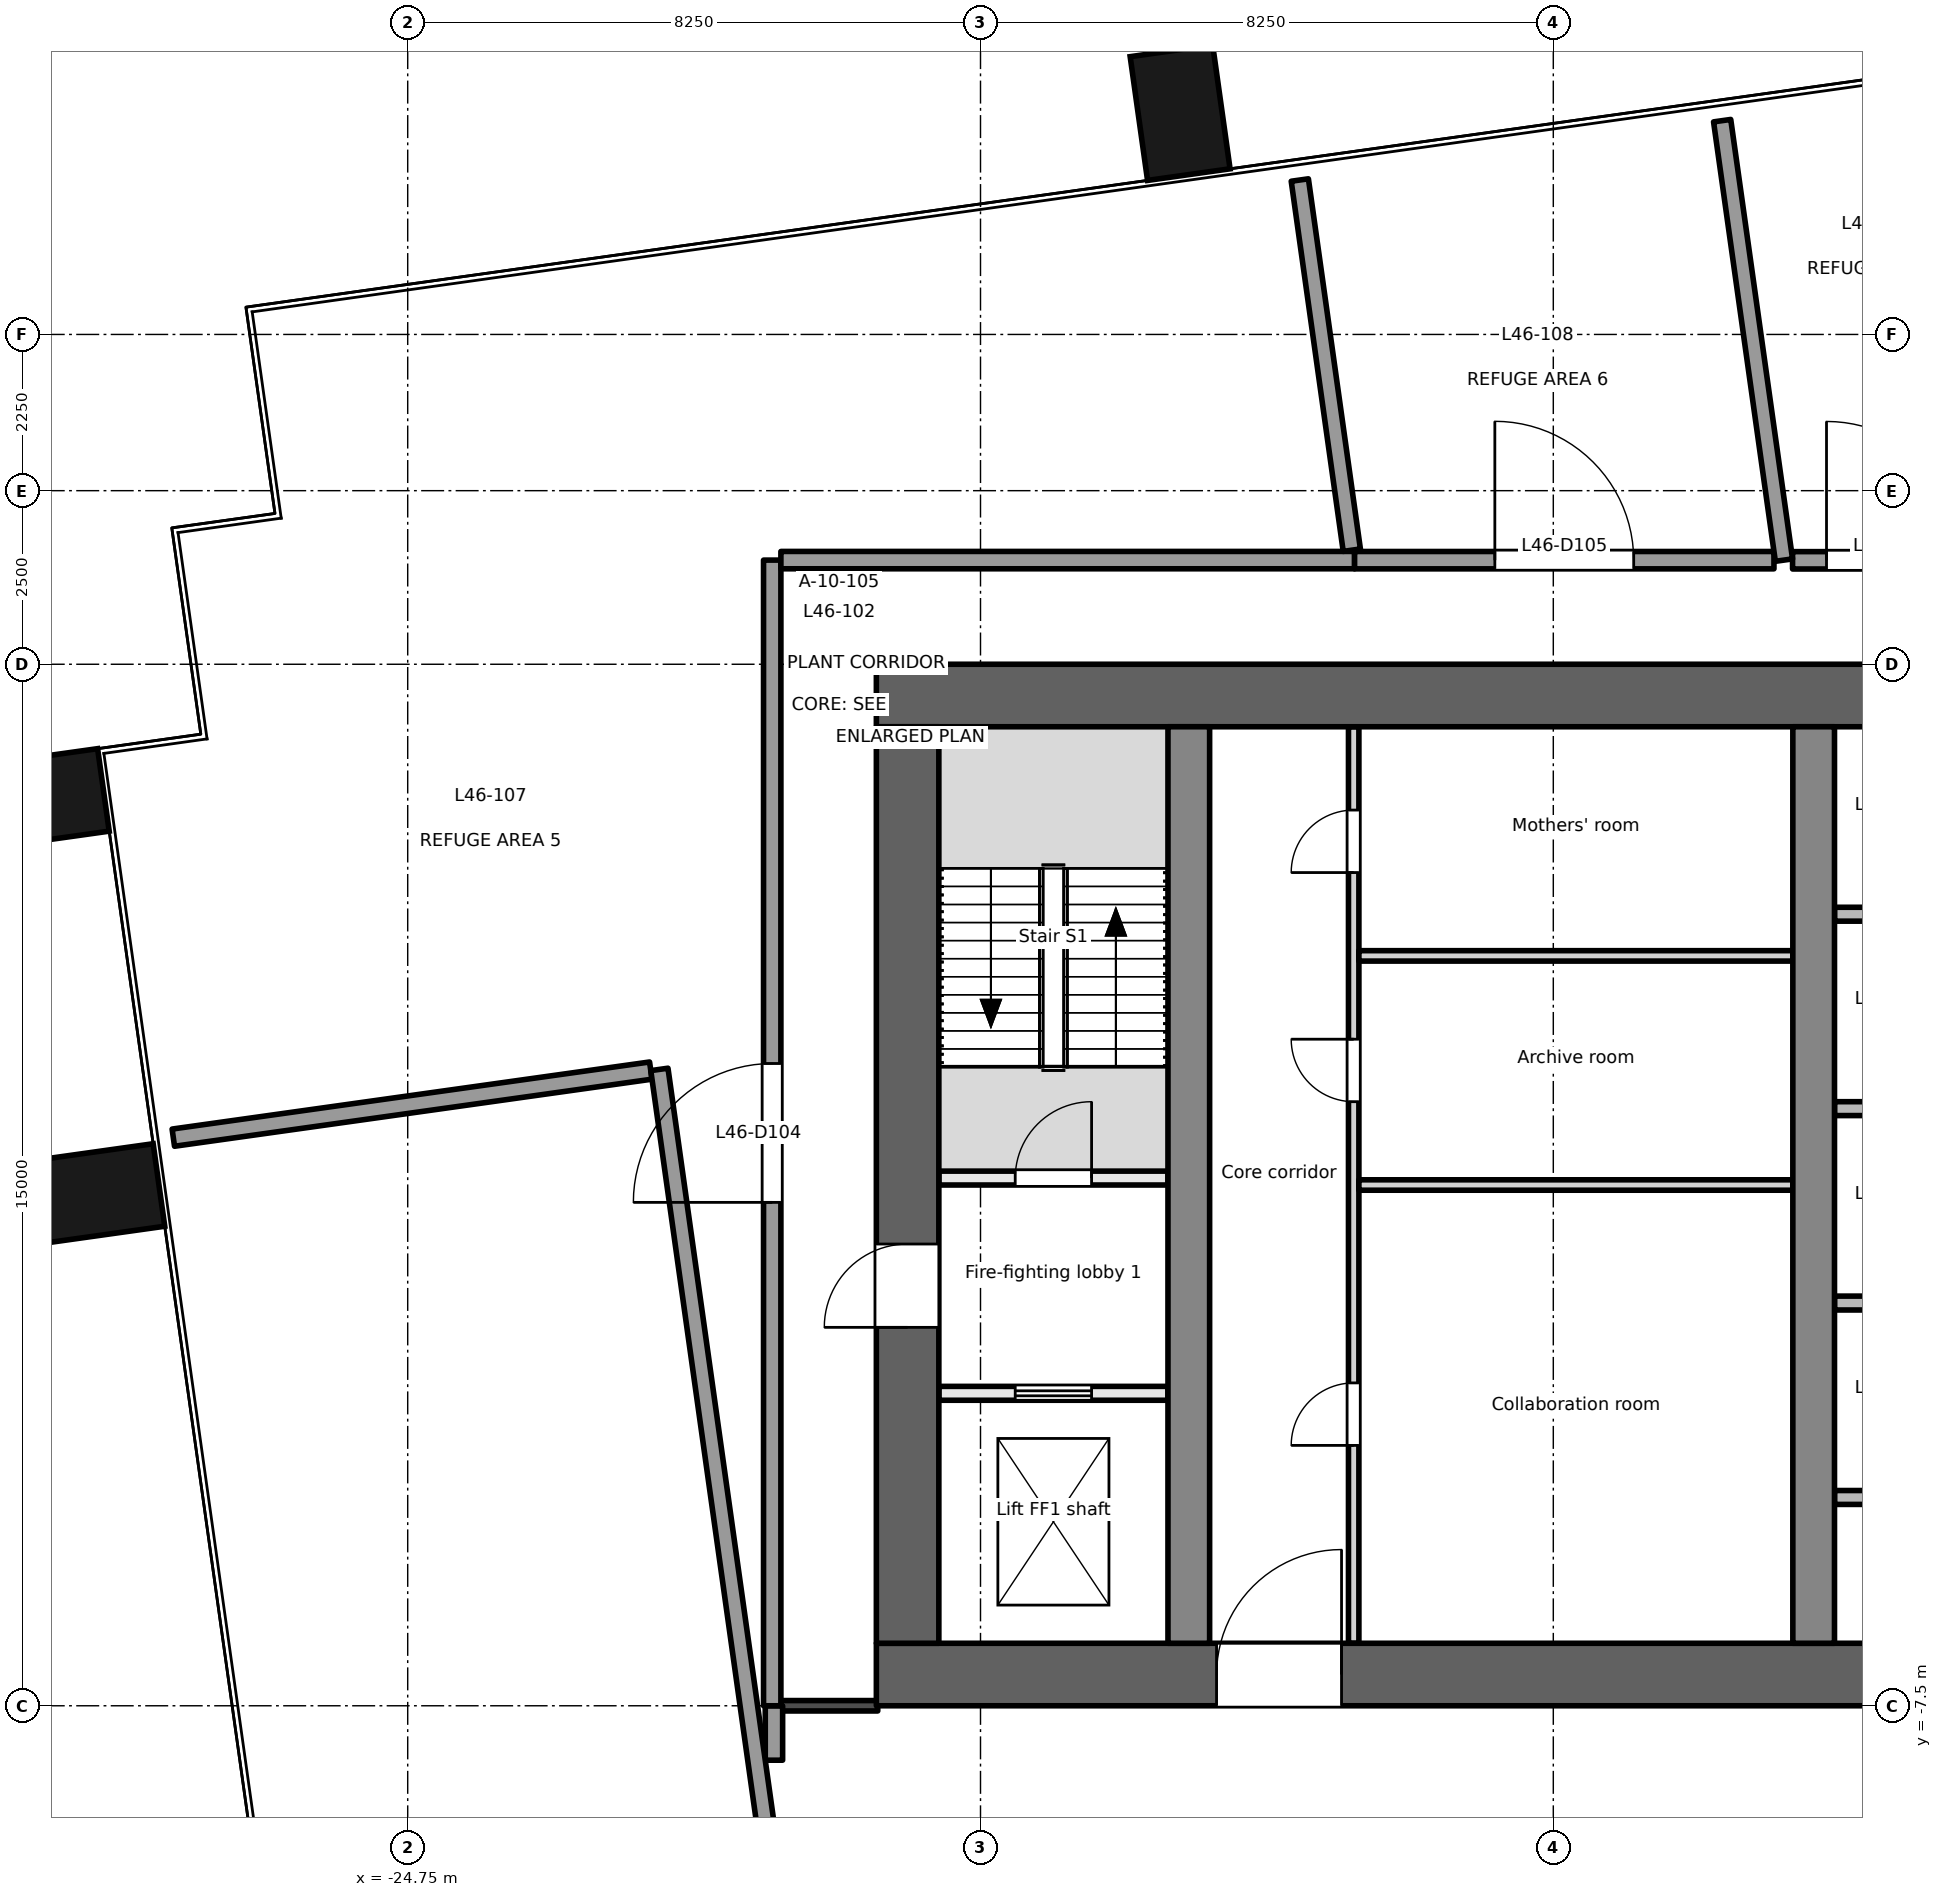
"""IFC4 building model, lengths in metres.
Left out: names, types, materials, properties, quantities, classifications, styles, units other than length and angle.
Written with IfcOpenShell. Run it as: python <this file> out.ifc"""

import sys

from ifc_helpers import new_model, si_unit, direction, frame, frame_2d, origin, origin_2d, place, context, subcontext, project, spatial, rectangle, extrude, element, fill, save


model = new_model("IFC4")
c1 = context("Model", 3, precision=1e-05, world=origin(), true_north=direction((0.0, 1.0)))
c2 = subcontext(c1, "Body", "Model", "MODEL_VIEW")
j1 = project(units=[si_unit("LENGTHUNIT", "METRE"), si_unit("PLANEANGLEUNIT", "RADIAN")], contexts=[c1])
p1 = place(None, origin())
s1 = spatial("IfcSite", under=j1, at=p1, CompositionType="ELEMENT")
p2 = place(p1, origin())
s2 = spatial("IfcBuilding", under=s1, at=p2, CompositionType="ELEMENT")
p3 = place(p2, frame((0.0, 0.0, 199.7)))
s3 = spatial("IfcBuildingStorey", under=s2, at=p3, CompositionType="ELEMENT", Elevation=199.7)
for number, where, z_axis, x_axis in (
    (1, (-29.224, -0.125, -0.2), (0.0, 0.0, 1.0), (-0.139, 0.99, 0.0)),
    (2, (-30.024, 5.565, -0.2), (0.0, 0.0, 1.0), (-0.139, 0.99, 0.0)),
    (3, (-13.625, 15.443, -0.2), (0.0, 0.0, 1.0), (0.99, 0.139, 0.0)),
):
    element("IfcColumn", number, at=place(p3, frame(where, z_axis=z_axis, x_axis=x_axis)), inside=s3, PredefinedType="COLUMN", context=c2, shape_type="SweptSolid", body=[
        extrude(rectangle(XDim=1.2, YDim=1.8, at=origin_2d()), origin(), (0.0, 0.0, 1.0), 8.4),
    ])
p4 = place(p3, frame((-18.0, -7.05, -0.2), z_axis=(0.0, 0.0, 1.0), x_axis=(1.0, 0.0, 0.0)))
e4 = element("IfcWall", 4, at=p4, inside=s3, PredefinedType="SHEAR", context=c2, shape_type="SweptSolid", body=[
    extrude(rectangle(XDim=36.0, YDim=0.9, at=frame_2d((18.0, 0.0))), origin(), (0.0, 0.0, 1.0), 8.4),
])
p5 = place(p4, frame((4.9, 0.0, 0.2)))
e5 = element("IfcOpeningElement", 5, at=p5, cuts=e4, PredefinedType="OPENING", context=c2, shape_type="SweptSolid", body=[
    extrude(rectangle(XDim=1.8, YDim=2.1, at=frame_2d((0.9, 1.05))), frame((0.0, 0.46, 0.0), z_axis=(0.0, -1.0, 0.0), x_axis=(1.0, 0.0, 0.0)), (0.0, 0.0, 1.0), 0.921),
])
p6 = place(p4, frame((17.4, 0.0, 0.2)))
e6 = element("IfcOpeningElement", 6, at=p6, cuts=e4, PredefinedType="OPENING", context=c2, shape_type="SweptSolid", body=[
    extrude(rectangle(XDim=1.2, YDim=2.1, at=frame_2d((0.6, 1.05))), frame((0.0, 0.46, 0.0), z_axis=(0.0, -1.0, 0.0), x_axis=(1.0, 0.0, 0.0)), (0.0, 0.0, 1.0), 0.921),
])
p7 = place(p4, frame((26.1, 0.0, 0.2)))
e7 = element("IfcOpeningElement", 7, at=p7, cuts=e4, PredefinedType="OPENING", context=c2, shape_type="SweptSolid", body=[
    extrude(rectangle(XDim=2.4, YDim=2.1, at=frame_2d((1.2, 1.05))), frame((0.0, 0.46, 0.0), z_axis=(0.0, -1.0, 0.0), x_axis=(1.0, 0.0, 0.0)), (0.0, 0.0, 1.0), 0.921),
])
p8 = place(p3, frame((-18.0, 7.05, -0.2), z_axis=(0.0, 0.0, 1.0), x_axis=(1.0, 0.0, 0.0)))
e8 = element("IfcWall", 8, at=p8, inside=s3, PredefinedType="SHEAR", context=c2, shape_type="SweptSolid", body=[
    extrude(rectangle(XDim=36.0, YDim=0.9, at=frame_2d((18.0, 0.0))), origin(), (0.0, 0.0, 1.0), 8.4),
])
p9 = place(p3, frame((-17.55, -6.6, -0.2), z_axis=(0.0, 0.0, 1.0), x_axis=(0.0, 1.0, 0.0)))
e9 = element("IfcWall", 9, at=p9, inside=s3, PredefinedType="SHEAR", context=c2, shape_type="SweptSolid", body=[
    extrude(rectangle(XDim=13.2, YDim=0.9, at=frame_2d((6.6, 0.0))), origin(), (0.0, 0.0, 1.0), 8.4),
])
p10 = place(p9, frame((4.55, 0.0, 0.2)))
e10 = element("IfcOpeningElement", 10, at=p10, cuts=e9, PredefinedType="OPENING", context=c2, shape_type="SweptSolid", body=[
    extrude(rectangle(XDim=1.2, YDim=2.1, at=frame_2d((0.6, 1.05))), frame((0.0, 0.46, 0.0), z_axis=(0.0, -1.0, 0.0), x_axis=(1.0, 0.0, 0.0)), (0.0, 0.0, 1.0), 0.921),
])
for number, where, z_axis, x_axis in (
    (11, (-13.5, -6.6, -0.2), (0.0, 0.0, 1.0), (0.0, 1.0, 0.0)),
    (12, (-4.5, -6.6, -0.2), (0.0, 0.0, 1.0), (0.0, 1.0, 0.0)),
):
    element("IfcWall", number, at=place(p3, frame(where, z_axis=z_axis, x_axis=x_axis)), inside=s3, PredefinedType="SHEAR", context=c2, shape_type="SweptSolid", body=[
        extrude(rectangle(XDim=13.2, YDim=0.6, at=frame_2d((6.6, 0.0))), origin(), (0.0, 0.0, 1.0), 8.4),
    ])
p11 = place(p3, frame((-17.1, -3.0, 0.0), z_axis=(0.0, 0.0, 1.0), x_axis=(1.0, 0.0, 0.0)))
e13 = element("IfcWall", 13, at=p11, inside=s3, PredefinedType="PARTITIONING", context=c2, shape_type="SweptSolid", body=[
    extrude(rectangle(XDim=3.3, YDim=0.2, at=frame_2d((1.65, 0.0))), origin(), (0.0, 0.0, 1.0), 8.2),
])
p12 = place(p11, frame((1.1, 0.0, 0.0)))
e14 = element("IfcOpeningElement", 14, at=p12, cuts=e13, PredefinedType="OPENING", context=c2, shape_type="SweptSolid", body=[
    extrude(rectangle(XDim=1.1, YDim=2.1, at=frame_2d((0.55, 1.05))), frame((0.0, 0.111, 0.0), z_axis=(0.0, -1.0, 0.0), x_axis=(1.0, 0.0, 0.0)), (0.0, 0.0, 1.0), 0.221),
])
p13 = place(p3, frame((-17.1, 0.1, 0.0), z_axis=(0.0, 0.0, 1.0), x_axis=(1.0, 0.0, 0.0)))
e15 = element("IfcWall", 15, at=p13, inside=s3, PredefinedType="PARTITIONING", context=c2, shape_type="SweptSolid", body=[
    extrude(rectangle(XDim=3.3, YDim=0.2, at=frame_2d((1.65, 0.0))), origin(), (0.0, 0.0, 1.0), 8.2),
])
p14 = place(p13, frame((1.1, 0.0, 0.0)))
e16 = element("IfcOpeningElement", 16, at=p14, cuts=e15, PredefinedType="OPENING", context=c2, shape_type="SweptSolid", body=[
    extrude(rectangle(XDim=1.1, YDim=2.1, at=frame_2d((0.55, 1.05))), frame((0.0, 0.111, 0.0), z_axis=(0.0, -1.0, 0.0), x_axis=(1.0, 0.0, 0.0)), (0.0, 0.0, 1.0), 0.221),
])
p15 = place(p3, frame((-11.125, -6.6, 0.0), z_axis=(0.0, 0.0, 1.0), x_axis=(0.0, 1.0, 0.0)))
e17 = element("IfcWall", 17, at=p15, inside=s3, PredefinedType="PARTITIONING", context=c2, shape_type="SweptSolid", body=[
    extrude(rectangle(XDim=13.2, YDim=0.15, at=frame_2d((6.6, 0.0))), origin(), (0.0, 0.0, 1.0), 8.2),
])
p16 = place(p15, frame((2.85, 0.0, 0.0)))
e18 = element("IfcOpeningElement", 18, at=p16, cuts=e17, PredefinedType="OPENING", context=c2, shape_type="SweptSolid", body=[
    extrude(rectangle(XDim=0.9, YDim=2.1, at=frame_2d((0.45, 1.05))), frame((0.0, 0.085, 0.0), z_axis=(0.0, -1.0, 0.0), x_axis=(1.0, 0.0, 0.0)), (0.0, 0.0, 1.0), 0.171),
])
p17 = place(p15, frame((7.8, 0.0, 0.0)))
e19 = element("IfcOpeningElement", 19, at=p17, cuts=e17, PredefinedType="OPENING", context=c2, shape_type="SweptSolid", body=[
    extrude(rectangle(XDim=0.9, YDim=2.1, at=frame_2d((0.45, 1.05))), frame((0.0, 0.085, 0.0), z_axis=(0.0, -1.0, 0.0), x_axis=(1.0, 0.0, 0.0)), (0.0, 0.0, 1.0), 0.171),
])
p18 = place(p15, frame((11.1, 0.0, 0.0)))
e20 = element("IfcOpeningElement", 20, at=p18, cuts=e17, PredefinedType="OPENING", context=c2, shape_type="SweptSolid", body=[
    extrude(rectangle(XDim=0.9, YDim=2.1, at=frame_2d((0.45, 1.05))), frame((0.0, 0.085, 0.0), z_axis=(0.0, -1.0, 0.0), x_axis=(1.0, 0.0, 0.0)), (0.0, 0.0, 1.0), 0.171),
])
for number, where, z_axis, x_axis in (
    (21, (-11.05, 0.0, 0.0), (0.0, 0.0, 1.0), (1.0, 0.0, 0.0)),
    (22, (-11.05, 3.3, 0.0), (0.0, 0.0, 1.0), (1.0, 0.0, 0.0)),
):
    element("IfcWall", number, at=place(p3, frame(where, z_axis=z_axis, x_axis=x_axis)), inside=s3, PredefinedType="PARTITIONING", context=c2, shape_type="SweptSolid", body=[
        extrude(rectangle(XDim=6.25, YDim=0.15, at=frame_2d((3.125, 0.0))), origin(), (0.0, 0.0, 1.0), 8.2),
    ])
for number, where, z_axis, x_axis in (
    (23, (-4.2, -1.7, 0.0), (0.0, 0.0, 1.0), (1.0, 0.0, 0.0)),
    (24, (-4.2, 1.1, 0.0), (0.0, 0.0, 1.0), (1.0, 0.0, 0.0)),
    (25, (-4.2, 3.9, 0.0), (0.0, 0.0, 1.0), (1.0, 0.0, 0.0)),
    (26, (-4.2, -4.5, 0.0), (0.0, 0.0, 1.0), (1.0, 0.0, 0.0)),
):
    element("IfcWall", number, at=place(p3, frame(where, z_axis=z_axis, x_axis=x_axis)), inside=s3, PredefinedType="PARTITIONING", context=c2, shape_type="SweptSolid", body=[
        extrude(rectangle(XDim=2.3, YDim=0.2, at=frame_2d((1.15, 0.0))), origin(), (0.0, 0.0, 1.0), 8.2),
    ])
p19 = place(p3, frame((-19.375, -7.5, 0.0), z_axis=(0.0, 0.0, 1.0), x_axis=(1.0, 0.0, 0.0)))
e27 = element("IfcWall", 27, at=p19, inside=s3, PredefinedType="PARTITIONING", context=c2, shape_type="SweptSolid", body=[
    extrude(rectangle(XDim=1.395, YDim=0.15, at=frame_2d((0.698, 0.0))), origin(), (0.0, 0.0, 1.0), 8.2),
])
p20 = place(p3, frame((-19.475, -8.284, 0.0), z_axis=(0.0, 0.0, 1.0), x_axis=(0.0, 1.0, 0.0)))
e28 = element("IfcWall", 28, at=p20, inside=s3, PredefinedType="PARTITIONING", context=c2, shape_type="SweptSolid", body=[
    extrude(rectangle(XDim=0.784, YDim=0.25, at=frame_2d((0.392, 0.0))), origin(), (0.0, 0.0, 1.0), 8.2),
])
p21 = place(p3, frame((-19.5, -7.5, 0.0), z_axis=(0.0, 0.0, 1.0), x_axis=(0.0, 1.0, 0.0)))
e29 = element("IfcWall", 29, at=p21, inside=s3, PredefinedType="PARTITIONING", context=c2, shape_type="SweptSolid", body=[
    extrude(rectangle(XDim=16.5, YDim=0.25, at=frame_2d((8.25, 0.0))), origin(), (0.0, 0.0, 1.0), 6.15),
])
p22 = place(p21, frame((7.25, 0.0, 0.0)))
e30 = element("IfcOpeningElement", 30, at=p22, cuts=e29, PredefinedType="OPENING", context=c2, shape_type="SweptSolid", body=[
    extrude(rectangle(XDim=2.0, YDim=2.1, at=frame_2d((1.0, 1.05))), frame((0.0, 0.135, 0.0), z_axis=(0.0, -1.0, 0.0), x_axis=(1.0, 0.0, 0.0)), (0.0, 0.0, 1.0), 0.271),
])
p23 = place(p3, frame((-19.375, 9.0, 0.0), z_axis=(0.0, 0.0, 1.0), x_axis=(1.0, 0.0, 0.0)))
e31 = element("IfcWall", 31, at=p23, inside=s3, PredefinedType="PARTITIONING", context=c2, shape_type="SweptSolid", body=[
    extrude(rectangle(XDim=8.263, YDim=0.25, at=frame_2d((4.131, 0.0))), origin(), (0.0, 0.0, 1.0), 7.9),
])
p24 = place(p3, frame((-11.112, 8.999, 0.0), z_axis=(0.0, 0.0, 1.0), x_axis=(1.0, 0.0, 0.0)))
e32 = element("IfcWall", 32, at=p24, inside=s3, PredefinedType="PARTITIONING", context=c2, shape_type="SweptSolid", body=[
    extrude(rectangle(XDim=6.04, YDim=0.25, at=frame_2d((3.02, 0.0))), origin(), (0.0, 0.0, 1.0), 7.9),
])
p25 = place(p24, frame((2.02, 0.0, 0.0)))
e33 = element("IfcOpeningElement", 33, at=p25, cuts=e32, PredefinedType="OPENING", context=c2, shape_type="SweptSolid", body=[
    extrude(rectangle(XDim=2.0, YDim=2.1, at=frame_2d((1.0, 1.05))), frame((0.0, 0.135, 0.0), z_axis=(0.0, -1.0, 0.0), x_axis=(1.0, 0.0, 0.0)), (0.0, 0.0, 1.0), 0.271),
])
p26 = place(p3, frame((-4.804, 8.997, 0.0), z_axis=(0.0, 0.0, 1.0), x_axis=(1.0, 0.0, 0.0)))
e34 = element("IfcWall", 34, at=p26, inside=s3, PredefinedType="PARTITIONING", context=c2, shape_type="SweptSolid", body=[
    extrude(rectangle(XDim=2.977, YDim=0.25, at=frame_2d((1.489, 0.0))), origin(), (0.0, 0.0, 1.0), 7.9),
])
p27 = place(p26, frame((0.489, 0.0, 0.0)))
e35 = element("IfcOpeningElement", 35, at=p27, cuts=e34, PredefinedType="OPENING", context=c2, shape_type="SweptSolid", body=[
    extrude(rectangle(XDim=2.0, YDim=2.1, at=frame_2d((1.0, 1.05))), frame((0.0, 0.135, 0.0), z_axis=(0.0, -1.0, 0.0), x_axis=(1.0, 0.0, 0.0)), (0.0, 0.0, 1.0), 0.271),
])
p28 = place(p3, frame((-28.126, 0.682, 0.0), z_axis=(0.0, 0.0, 1.0), x_axis=(0.990276566438, 0.13911262331, 0.0)))
e36 = element("IfcWall", 36, at=p28, inside=s3, PredefinedType="PARTITIONING", context=c2, shape_type="SweptSolid", body=[
    extrude(rectangle(XDim=6.945, YDim=0.25, at=frame_2d((3.472, 0.0))), origin(), (0.0, 0.0, 1.0), 7.1),
])
p29 = place(p3, frame((-21.125, 1.665, 0.0), z_axis=(0.0, 0.0, 1.0), x_axis=(0.139178578933, -0.990267298847, 0.0)))
e37 = element("IfcWall", 37, at=p29, inside=s3, PredefinedType="PARTITIONING", context=c2, shape_type="SweptSolid", body=[
    extrude(rectangle(XDim=11.676, YDim=0.25, at=frame_2d((5.838, 0.0))), origin(), (0.0, 0.0, 1.0), 6.15),
])
p30 = place(p3, frame((-11.901, 14.474, 0.0), z_axis=(0.0, 0.0, 1.0), x_axis=(0.139090841418, -0.990279626082, 0.0)))
e38 = element("IfcWall", 38, at=p30, inside=s3, PredefinedType="PARTITIONING", context=c2, shape_type="SweptSolid", body=[
    extrude(rectangle(XDim=5.383, YDim=0.25, at=frame_2d((2.692, 0.0))), origin(), (0.0, 0.0, 1.0), 7.1),
])
p31 = place(p3, frame((-5.818, 15.329, 0.0), z_axis=(0.0, 0.0, 1.0), x_axis=(0.139271219089, -0.990254274181, 0.0)))
e39 = element("IfcWall", 39, at=p31, inside=s3, PredefinedType="PARTITIONING", context=c2, shape_type="SweptSolid", body=[
    extrude(rectangle(XDim=6.391, YDim=0.25, at=frame_2d((3.196, 0.0))), origin(), (0.0, 0.0, 1.0), 7.1),
])
p32 = place(p12, origin())
e40 = element("IfcDoor", 40, at=p32, inside=s3, OperationType="DOUBLE_DOOR_SLIDING", PredefinedType="DOOR", context=c2, shape_type="SweptSolid", body=[
    extrude(rectangle(XDim=1.1, YDim=2.1, at=frame_2d((0.55, 1.05))), frame((0.0, 0.025, 0.0), z_axis=(0.0, -1.0, 0.0), x_axis=(1.0, 0.0, 0.0)), (0.0, 0.0, 1.0), 0.05),
])
fill(e14, e40)
p33 = place(p10, origin())
e41 = element("IfcDoor", 41, at=p33, inside=s3, OperationType="SINGLE_SWING_LEFT", PredefinedType="DOOR", context=c2, shape_type="SweptSolid", body=[
    extrude(rectangle(XDim=1.2, YDim=2.1, at=frame_2d((0.6, 1.05))), frame((0.0, 0.025, 0.0), z_axis=(0.0, -1.0, 0.0), x_axis=(1.0, 0.0, 0.0)), (0.0, 0.0, 1.0), 0.05),
])
fill(e10, e41)
p34 = place(p14, origin())
e42 = element("IfcDoor", 42, at=p34, inside=s3, OperationType="SINGLE_SWING_RIGHT", PredefinedType="DOOR", context=c2, shape_type="SweptSolid", body=[
    extrude(rectangle(XDim=1.1, YDim=2.1, at=frame_2d((0.55, 1.05))), frame((0.0, 0.025, 0.0), z_axis=(0.0, -1.0, 0.0), x_axis=(1.0, 0.0, 0.0)), (0.0, 0.0, 1.0), 0.05),
])
fill(e16, e42)
p35 = place(p16, origin())
e43 = element("IfcDoor", 43, at=p35, inside=s3, OperationType="SINGLE_SWING_LEFT", PredefinedType="DOOR", context=c2, shape_type="SweptSolid", body=[
    extrude(rectangle(XDim=0.9, YDim=2.1, at=frame_2d((0.45, 1.05))), frame((0.0, 0.025, 0.0), z_axis=(0.0, -1.0, 0.0), x_axis=(1.0, 0.0, 0.0)), (0.0, 0.0, 1.0), 0.05),
])
fill(e18, e43)
p36 = place(p17, origin())
e44 = element("IfcDoor", 44, at=p36, inside=s3, OperationType="SINGLE_SWING_RIGHT", PredefinedType="DOOR", context=c2, shape_type="SweptSolid", body=[
    extrude(rectangle(XDim=0.9, YDim=2.1, at=frame_2d((0.45, 1.05))), frame((0.0, 0.025, 0.0), z_axis=(0.0, -1.0, 0.0), x_axis=(1.0, 0.0, 0.0)), (0.0, 0.0, 1.0), 0.05),
])
fill(e19, e44)
p37 = place(p18, origin())
e45 = element("IfcDoor", 45, at=p37, inside=s3, OperationType="SINGLE_SWING_LEFT", PredefinedType="DOOR", context=c2, shape_type="SweptSolid", body=[
    extrude(rectangle(XDim=0.9, YDim=2.1, at=frame_2d((0.45, 1.05))), frame((0.0, 0.025, 0.0), z_axis=(0.0, -1.0, 0.0), x_axis=(1.0, 0.0, 0.0)), (0.0, 0.0, 1.0), 0.05),
])
fill(e20, e45)
p38 = place(p5, origin())
e46 = element("IfcDoor", 46, at=p38, inside=s3, OperationType="SINGLE_SWING_RIGHT", PredefinedType="DOOR", context=c2, shape_type="SweptSolid", body=[
    extrude(rectangle(XDim=1.8, YDim=2.1, at=frame_2d((0.9, 1.05))), frame((0.0, 0.025, 0.0), z_axis=(0.0, -1.0, 0.0), x_axis=(1.0, 0.0, 0.0)), (0.0, 0.0, 1.0), 0.05),
])
fill(e5, e46)
p39 = place(p22, origin())
e47 = element("IfcDoor", 47, at=p39, inside=s3, OperationType="DOUBLE_DOOR_SINGLE_SWING", PredefinedType="DOOR", context=c2, shape_type="SweptSolid", body=[
    extrude(rectangle(XDim=2.0, YDim=2.1, at=frame_2d((1.0, 1.05))), frame((0.0, 0.025, 0.0), z_axis=(0.0, -1.0, 0.0), x_axis=(1.0, 0.0, 0.0)), (0.0, 0.0, 1.0), 0.05),
])
fill(e30, e47)
p40 = place(p25, origin())
e48 = element("IfcDoor", 48, at=p40, inside=s3, OperationType="DOUBLE_DOOR_SINGLE_SWING", PredefinedType="DOOR", context=c2, shape_type="SweptSolid", body=[
    extrude(rectangle(XDim=2.0, YDim=2.1, at=frame_2d((1.0, 1.05))), frame((0.0, 0.025, 0.0), z_axis=(0.0, -1.0, 0.0), x_axis=(1.0, 0.0, 0.0)), (0.0, 0.0, 1.0), 0.05),
])
fill(e33, e48)
p41 = place(p27, origin())
e49 = element("IfcDoor", 49, at=p41, inside=s3, OperationType="DOUBLE_DOOR_SINGLE_SWING", PredefinedType="DOOR", context=c2, shape_type="SweptSolid", body=[
    extrude(rectangle(XDim=2.0, YDim=2.1, at=frame_2d((1.0, 1.05))), frame((0.0, 0.025, 0.0), z_axis=(0.0, -1.0, 0.0), x_axis=(1.0, 0.0, 0.0)), (0.0, 0.0, 1.0), 0.05),
])
fill(e35, e49)
save(model, sys.argv[1])
